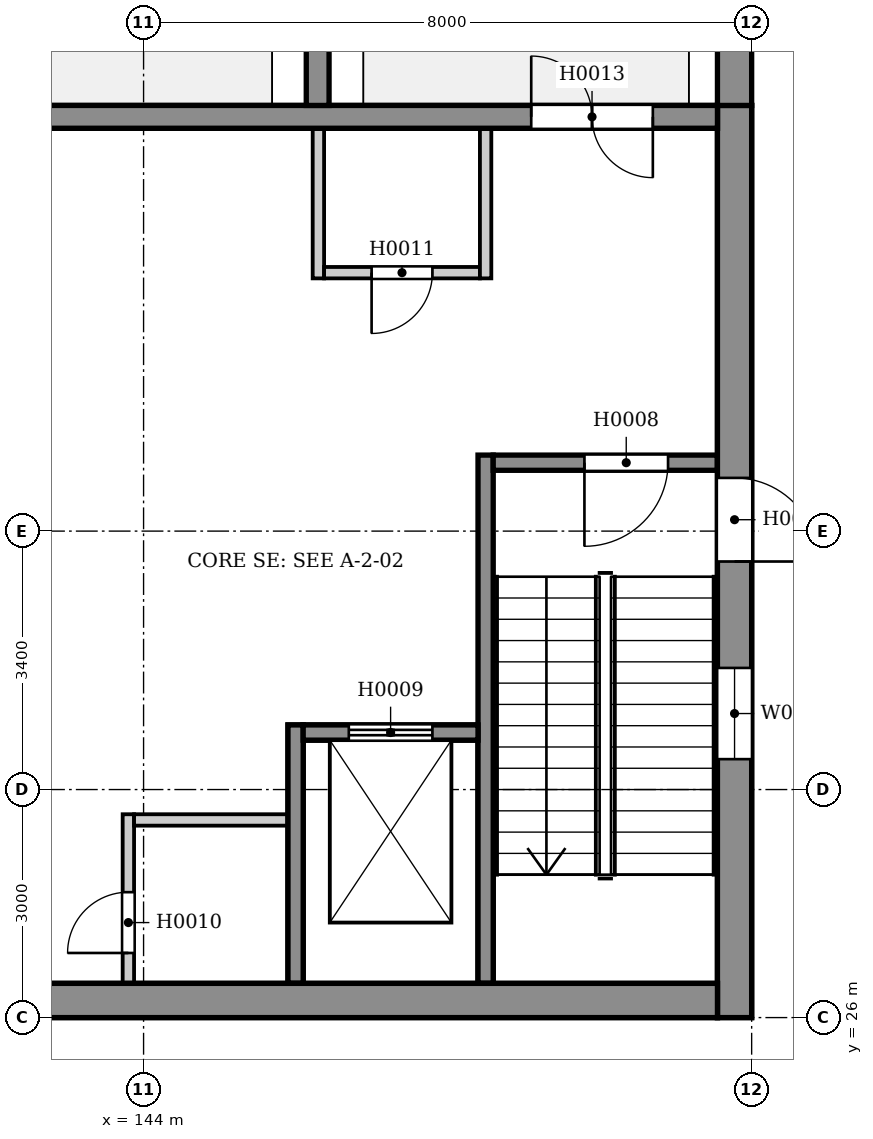
"""IFC4 building model, lengths in metres.
Left out: names, types, materials, properties, quantities, classifications, styles, units other than length and angle.
Written with IfcOpenShell. Run it as: python <this file> out.ifc"""

import sys

from ifc_helpers import new_model, si_unit, direction, frame, frame_2d, origin, place, context, subcontext, project, spatial, rectangle, extrude, element, fill, save


model = new_model("IFC4")
c1 = context("Model", 3, precision=1e-05, world=origin(), true_north=direction((0.0, 1.0)))
c2 = subcontext(c1, "Body", "Model", "MODEL_VIEW")
j1 = project(units=[si_unit("LENGTHUNIT", "METRE"), si_unit("PLANEANGLEUNIT", "RADIAN")], contexts=[c1])
p1 = place(None, origin())
s1 = spatial("IfcSite", under=j1, at=p1, CompositionType="ELEMENT")
p2 = place(p1, origin())
s2 = spatial("IfcBuilding", under=s1, at=p2, CompositionType="ELEMENT")
p3 = place(p2, origin())
s3 = spatial("IfcBuildingStorey", under=s2, at=p3, CompositionType="ELEMENT", Elevation=0.0)
p4 = place(p3, frame((151.775, 38.0, 0.0), z_axis=(0.0, 0.0, 1.0), x_axis=(0.0, 1.0, 0.0)))
e1 = element("IfcWall", 1, at=p4, inside=s3, PredefinedType="ELEMENTEDWALL", context=c2, shape_type="SweptSolid", body=[
    extrude(rectangle(XDim=46.0, YDim=0.45, at=frame_2d((23.0, 0.0))), origin(), (0.0, 0.0, 1.0), 5.0),
])
p5 = place(p4, frame((10.9, 0.0, 0.0), z_axis=(0.0, 0.0, 1.0), x_axis=(-1.0, 0.0, 0.0)))
e2 = element("IfcOpeningElement", 2, at=p5, cuts=e1, PredefinedType="OPENING", context=c2, shape_type="SweptSolid", body=[
    extrude(rectangle(XDim=1.8, YDim=2.4, at=frame_2d((0.9, 1.2))), frame((0.0, 0.235, 0.0), z_axis=(0.0, -1.0, 0.0), x_axis=(1.0, 0.0, 0.0)), (0.0, 0.0, 1.0), 0.47),
])
p6 = place(p4, frame((36.9, 0.0, 0.0), z_axis=(0.0, 0.0, 1.0), x_axis=(-1.0, 0.0, 0.0)))
e3 = element("IfcOpeningElement", 3, at=p6, cuts=e1, PredefinedType="OPENING", context=c2, shape_type="SweptSolid", body=[
    extrude(rectangle(XDim=1.8, YDim=2.4, at=frame_2d((0.9, 1.2))), frame((0.0, 0.235, 0.0), z_axis=(0.0, -1.0, 0.0), x_axis=(1.0, 0.0, 0.0)), (0.0, 0.0, 1.0), 0.47),
])
p7 = place(p4, frame((31.1, 0.0, 0.0)))
e4 = element("IfcOpeningElement", 4, at=p7, cuts=e1, PredefinedType="OPENING", context=c2, shape_type="SweptSolid", body=[
    extrude(rectangle(XDim=1.8, YDim=2.4, at=frame_2d((0.9, 1.2))), frame((0.0, 0.235, 0.0), z_axis=(0.0, -1.0, 0.0), x_axis=(1.0, 0.0, 0.0)), (0.0, 0.0, 1.0), 0.47),
])
p8 = place(p3, frame((146.29, 38.0, 0.0), z_axis=(0.0, 0.0, 1.0), x_axis=(0.0, 1.0, 0.0)))
e5 = element("IfcWall", 5, at=p8, inside=s3, PredefinedType="SOLIDWALL", context=c2, shape_type="SweptSolid", body=[
    extrude(rectangle(XDim=46.0, YDim=0.3, at=frame_2d((23.0, 0.0))), origin(), (0.0, 0.0, 1.0), 5.0),
])
p9 = place(p8, frame((1.975, 0.0, 0.0)))
e6 = element("IfcOpeningElement", 6, at=p9, cuts=e5, PredefinedType="OPENING", context=c2, shape_type="SweptSolid", body=[
    extrude(rectangle(XDim=1.8, YDim=2.1, at=frame_2d((0.9, 1.05))), frame((0.0, 0.16, 0.0), z_axis=(0.0, -1.0, 0.0), x_axis=(1.0, 0.0, 0.0)), (0.0, 0.0, 1.0), 0.32),
])
p10 = place(p8, frame((7.725, 0.0, 0.0)))
e7 = element("IfcOpeningElement", 7, at=p10, cuts=e5, PredefinedType="OPENING", context=c2, shape_type="SweptSolid", body=[
    extrude(rectangle(XDim=1.8, YDim=2.1, at=frame_2d((0.9, 1.05))), frame((0.0, 0.16, 0.0), z_axis=(0.0, -1.0, 0.0), x_axis=(1.0, 0.0, 0.0)), (0.0, 0.0, 1.0), 0.32),
])
p11 = place(p8, frame((13.475, 0.0, 0.0)))
e8 = element("IfcOpeningElement", 8, at=p11, cuts=e5, PredefinedType="OPENING", context=c2, shape_type="SweptSolid", body=[
    extrude(rectangle(XDim=1.8, YDim=2.1, at=frame_2d((0.9, 1.05))), frame((0.0, 0.16, 0.0), z_axis=(0.0, -1.0, 0.0), x_axis=(1.0, 0.0, 0.0)), (0.0, 0.0, 1.0), 0.32),
])
p12 = place(p8, frame((19.225, 0.0, 0.0)))
e9 = element("IfcOpeningElement", 9, at=p12, cuts=e5, PredefinedType="OPENING", context=c2, shape_type="SweptSolid", body=[
    extrude(rectangle(XDim=1.8, YDim=2.1, at=frame_2d((0.9, 1.05))), frame((0.0, 0.16, 0.0), z_axis=(0.0, -1.0, 0.0), x_axis=(1.0, 0.0, 0.0)), (0.0, 0.0, 1.0), 0.32),
])
p13 = place(p8, frame((24.975, 0.0, 0.0)))
e10 = element("IfcOpeningElement", 10, at=p13, cuts=e5, PredefinedType="OPENING", context=c2, shape_type="SweptSolid", body=[
    extrude(rectangle(XDim=1.8, YDim=2.1, at=frame_2d((0.9, 1.05))), frame((0.0, 0.16, 0.0), z_axis=(0.0, -1.0, 0.0), x_axis=(1.0, 0.0, 0.0)), (0.0, 0.0, 1.0), 0.32),
])
p14 = place(p8, frame((30.725, 0.0, 0.0)))
e11 = element("IfcOpeningElement", 11, at=p14, cuts=e5, PredefinedType="OPENING", context=c2, shape_type="SweptSolid", body=[
    extrude(rectangle(XDim=1.8, YDim=2.1, at=frame_2d((0.9, 1.05))), frame((0.0, 0.16, 0.0), z_axis=(0.0, -1.0, 0.0), x_axis=(1.0, 0.0, 0.0)), (0.0, 0.0, 1.0), 0.32),
])
p15 = place(p8, frame((36.475, 0.0, 0.0)))
e12 = element("IfcOpeningElement", 12, at=p15, cuts=e5, PredefinedType="OPENING", context=c2, shape_type="SweptSolid", body=[
    extrude(rectangle(XDim=1.8, YDim=2.1, at=frame_2d((0.9, 1.05))), frame((0.0, 0.16, 0.0), z_axis=(0.0, -1.0, 0.0), x_axis=(1.0, 0.0, 0.0)), (0.0, 0.0, 1.0), 0.32),
])
p16 = place(p8, frame((42.225, 0.0, 0.0)))
e13 = element("IfcOpeningElement", 13, at=p16, cuts=e5, PredefinedType="OPENING", context=c2, shape_type="SweptSolid", body=[
    extrude(rectangle(XDim=1.8, YDim=2.1, at=frame_2d((0.9, 1.05))), frame((0.0, 0.16, 0.0), z_axis=(0.0, -1.0, 0.0), x_axis=(1.0, 0.0, 0.0)), (0.0, 0.0, 1.0), 0.32),
])
p17 = place(p3, frame((151.775, 26.0, -1.6), z_axis=(0.0, 0.0, 1.0), x_axis=(0.0, 1.0, 0.0)))
e14 = element("IfcWall", 14, at=p17, inside=s3, PredefinedType="ELEMENTEDWALL", context=c2, shape_type="SweptSolid", body=[
    extrude(rectangle(XDim=12.0, YDim=0.45, at=frame_2d((6.0, 0.0))), origin(), (0.0, 0.0, 1.0), 1.35),
])
p18 = place(p3, frame((151.775, 26.0, 0.0), z_axis=(0.0, 0.0, 1.0), x_axis=(0.0, 1.0, 0.0)))
e15 = element("IfcWall", 15, at=p18, inside=s3, PredefinedType="ELEMENTEDWALL", context=c2, shape_type="SweptSolid", body=[
    extrude(rectangle(XDim=12.0, YDim=0.45, at=frame_2d((6.0, 0.0))), origin(), (0.0, 0.0, 1.0), 5.0),
])
p19 = place(p18, frame((7.1, 0.0, 0.0), z_axis=(0.0, 0.0, 1.0), x_axis=(-1.0, 0.0, 0.0)))
e16 = element("IfcOpeningElement", 16, at=p19, cuts=e15, PredefinedType="OPENING", context=c2, shape_type="SweptSolid", body=[
    extrude(rectangle(XDim=1.1, YDim=2.1, at=frame_2d((0.55, 1.05))), frame((0.0, 0.235, 0.0), z_axis=(0.0, -1.0, 0.0), x_axis=(1.0, 0.0, 0.0)), (0.0, 0.0, 1.0), 0.47),
])
p20 = place(p18, frame((3.4, 0.0, 0.6)))
e17 = element("IfcOpeningElement", 17, at=p20, cuts=e15, PredefinedType="OPENING", context=c2, shape_type="SweptSolid", body=[
    extrude(rectangle(XDim=1.2, YDim=3.0, at=frame_2d((0.6, 1.5))), frame((0.0, 0.235, 0.0), z_axis=(0.0, -1.0, 0.0), x_axis=(1.0, 0.0, 0.0)), (0.0, 0.0, 1.0), 0.47),
])
p21 = place(p3, frame((151.55, 26.225, -1.6), z_axis=(0.0, 0.0, 1.0), x_axis=(-1.0, 0.0, 0.0)))
e18 = element("IfcWall", 18, at=p21, inside=s3, PredefinedType="ELEMENTEDWALL", context=c2, shape_type="SweptSolid", body=[
    extrude(rectangle(XDim=11.55, YDim=0.45, at=frame_2d((5.775, 0.0))), origin(), (0.0, 0.0, 1.0), 1.35),
])
p22 = place(p3, frame((151.55, 26.225, 0.0), z_axis=(0.0, 0.0, 1.0), x_axis=(-1.0, 0.0, 0.0)))
e19 = element("IfcWall", 19, at=p22, inside=s3, PredefinedType="ELEMENTEDWALL", context=c2, shape_type="SweptSolid", body=[
    extrude(rectangle(XDim=11.55, YDim=0.45, at=frame_2d((5.775, 0.0))), origin(), (0.0, 0.0, 1.0), 5.0),
])
p23 = place(p3, frame((151.55, 37.85, -1.6), z_axis=(0.0, 0.0, 1.0), x_axis=(-1.0, 0.0, 0.0)))
e20 = element("IfcWall", 20, at=p23, inside=s3, PredefinedType="SOLIDWALL", context=c2, shape_type="SweptSolid", body=[
    extrude(rectangle(XDim=11.55, YDim=0.3, at=frame_2d((5.775, 0.0))), origin(), (0.0, 0.0, 1.0), 1.35),
])
p24 = place(p3, frame((151.55, 37.85, 0.0), z_axis=(0.0, 0.0, 1.0), x_axis=(-1.0, 0.0, 0.0)))
e21 = element("IfcWall", 21, at=p24, inside=s3, PredefinedType="SOLIDWALL", context=c2, shape_type="SweptSolid", body=[
    extrude(rectangle(XDim=11.55, YDim=0.3, at=frame_2d((5.775, 0.0))), origin(), (0.0, 0.0, 1.0), 5.0),
])
p25 = place(p24, frame((0.85, 0.0, 0.0)))
e22 = element("IfcOpeningElement", 22, at=p25, cuts=e21, PredefinedType="OPENING", context=c2, shape_type="SweptSolid", body=[
    extrude(rectangle(XDim=1.6, YDim=2.1, at=frame_2d((0.8, 1.05))), frame((0.0, 0.16, 0.0), z_axis=(0.0, -1.0, 0.0), x_axis=(1.0, 0.0, 0.0)), (0.0, 0.0, 1.0), 0.32),
])
p26 = place(p3, frame((148.5, 26.45, 0.0), z_axis=(0.0, 0.0, 1.0), x_axis=(0.0, 1.0, 0.0)))
e23 = element("IfcWall", 23, at=p26, inside=s3, PredefinedType="SOLIDWALL", context=c2, shape_type="SweptSolid", body=[
    extrude(rectangle(XDim=6.95, YDim=0.2, at=frame_2d((3.475, 0.0))), origin(), (0.0, 0.0, 1.0), 5.0),
])
p27 = place(p3, frame((151.55, 33.3, 0.0), z_axis=(0.0, 0.0, 1.0), x_axis=(-1.0, 0.0, 0.0)))
e24 = element("IfcWall", 24, at=p27, inside=s3, PredefinedType="SOLIDWALL", context=c2, shape_type="SweptSolid", body=[
    extrude(rectangle(XDim=2.95, YDim=0.2, at=frame_2d((1.475, 0.0))), origin(), (0.0, 0.0, 1.0), 5.0),
])
p28 = place(p27, frame((0.65, 0.0, 0.0)))
e25 = element("IfcOpeningElement", 25, at=p28, cuts=e24, PredefinedType="OPENING", context=c2, shape_type="SweptSolid", body=[
    extrude(rectangle(XDim=1.1, YDim=2.1, at=frame_2d((0.55, 1.05))), frame((0.0, 0.11, 0.0), z_axis=(0.0, -1.0, 0.0), x_axis=(1.0, 0.0, 0.0)), (0.0, 0.0, 1.0), 0.22),
])
p29 = place(p3, frame((146.0, 26.45, 0.0), z_axis=(0.0, 0.0, 1.0), x_axis=(0.0, 1.0, 0.0)))
e26 = element("IfcWall", 26, at=p29, inside=s3, PredefinedType="SOLIDWALL", context=c2, shape_type="SweptSolid", body=[
    extrude(rectangle(XDim=3.4, YDim=0.2, at=frame_2d((1.7, 0.0))), origin(), (0.0, 0.0, 1.0), 5.0),
])
p30 = place(p3, frame((148.4, 29.75, 0.0), z_axis=(0.0, 0.0, 1.0), x_axis=(-1.0, 0.0, 0.0)))
e27 = element("IfcWall", 27, at=p30, inside=s3, PredefinedType="SOLIDWALL", context=c2, shape_type="SweptSolid", body=[
    extrude(rectangle(XDim=2.3, YDim=0.2, at=frame_2d((1.15, 0.0))), origin(), (0.0, 0.0, 1.0), 5.0),
])
p31 = place(p30, frame((0.6, 0.0, 0.0)))
e28 = element("IfcOpeningElement", 28, at=p31, cuts=e27, PredefinedType="OPENING", context=c2, shape_type="SweptSolid", body=[
    extrude(rectangle(XDim=1.1, YDim=2.1, at=frame_2d((0.55, 1.05))), frame((0.0, 0.11, 0.0), z_axis=(0.0, -1.0, 0.0), x_axis=(1.0, 0.0, 0.0)), (0.0, 0.0, 1.0), 0.22),
])
p32 = place(p3, frame((145.9, 28.6, 0.0), z_axis=(0.0, 0.0, 1.0), x_axis=(-1.0, 0.0, 0.0)))
e29 = element("IfcWall", 29, at=p32, inside=s3, PredefinedType="PARTITIONING", context=c2, shape_type="SweptSolid", body=[
    extrude(rectangle(XDim=2.025, YDim=0.15, at=frame_2d((1.012, 0.0))), origin(), (0.0, 0.0, 1.0), 4.75),
])
p33 = place(p3, frame((143.8, 26.45, 0.0), z_axis=(0.0, 0.0, 1.0), x_axis=(0.0, 1.0, 0.0)))
e30 = element("IfcWall", 30, at=p33, inside=s3, PredefinedType="PARTITIONING", context=c2, shape_type="SweptSolid", body=[
    extrude(rectangle(XDim=2.225, YDim=0.15, at=frame_2d((1.113, 0.0))), origin(), (0.0, 0.0, 1.0), 4.75),
])
p34 = place(p33, frame((0.4, 0.0, 0.0)))
e31 = element("IfcOpeningElement", 31, at=p34, cuts=e30, PredefinedType="OPENING", context=c2, shape_type="SweptSolid", body=[
    extrude(rectangle(XDim=0.8, YDim=2.1, at=frame_2d((0.4, 1.05))), frame((0.0, 0.085, 0.0), z_axis=(0.0, -1.0, 0.0), x_axis=(1.0, 0.0, 0.0)), (0.0, 0.0, 1.0), 0.17),
])
p35 = place(p3, frame((148.425, 35.8, 0.0), z_axis=(0.0, 0.0, 1.0), x_axis=(-1.0, 0.0, 0.0)))
e32 = element("IfcWall", 32, at=p35, inside=s3, PredefinedType="PARTITIONING", context=c2, shape_type="SweptSolid", body=[
    extrude(rectangle(XDim=2.05, YDim=0.15, at=frame_2d((1.025, 0.0))), origin(), (0.0, 0.0, 1.0), 4.75),
])
p36 = place(p35, frame((0.625, 0.0, 0.0)))
e33 = element("IfcOpeningElement", 33, at=p36, cuts=e32, PredefinedType="OPENING", context=c2, shape_type="SweptSolid", body=[
    extrude(rectangle(XDim=0.8, YDim=2.1, at=frame_2d((0.4, 1.05))), frame((0.0, 0.085, 0.0), z_axis=(0.0, -1.0, 0.0), x_axis=(1.0, 0.0, 0.0)), (0.0, 0.0, 1.0), 0.17),
])
for number, where, z_axis, x_axis in (
    (34, (148.5, 35.725, 0.0), (0.0, 0.0, 1.0), (0.0, 1.0, 0.0)),
    (35, (146.3, 35.725, 0.0), (0.0, 0.0, 1.0), (0.0, 1.0, 0.0)),
):
    element("IfcWall", number, at=place(p3, frame(where, z_axis=z_axis, x_axis=x_axis)), inside=s3, PredefinedType="PARTITIONING", context=c2, shape_type="SweptSolid", body=[
        extrude(rectangle(XDim=1.975, YDim=0.15, at=frame_2d((0.987, 0.0))), origin(), (0.0, 0.0, 1.0), 4.75),
    ])
for number, where, z_axis, x_axis in (
    (36, (148.5, 26.45, -1.3), (0.0, 0.0, 1.0), (0.0, 1.0, 0.0)),
    (37, (146.0, 26.45, -1.3), (0.0, 0.0, 1.0), (0.0, 1.0, 0.0)),
):
    element("IfcWall", number, at=place(p3, frame(where, z_axis=z_axis, x_axis=x_axis)), inside=s3, PredefinedType="SOLIDWALL", context=c2, shape_type="SweptSolid", body=[
        extrude(rectangle(XDim=3.4, YDim=0.2, at=frame_2d((1.7, 0.0))), origin(), (0.0, 0.0, 1.0), 1.05),
    ])
p37 = place(p3, frame((148.4, 29.75, -1.3), z_axis=(0.0, 0.0, 1.0), x_axis=(-1.0, 0.0, 0.0)))
e38 = element("IfcWall", 38, at=p37, inside=s3, PredefinedType="SOLIDWALL", context=c2, shape_type="SweptSolid", body=[
    extrude(rectangle(XDim=2.3, YDim=0.2, at=frame_2d((1.15, 0.0))), origin(), (0.0, 0.0, 1.0), 1.05),
])
p38 = place(p28, origin())
e39 = element("IfcDoor", 39, at=p38, inside=s3, OperationType="SINGLE_SWING_RIGHT", PredefinedType="DOOR", context=c2, shape_type="SweptSolid", body=[
    extrude(rectangle(XDim=1.1, YDim=2.1, at=frame_2d((0.55, 1.05))), frame((0.0, 0.025, 0.0), z_axis=(0.0, -1.0, 0.0), x_axis=(1.0, 0.0, 0.0)), (0.0, 0.0, 1.0), 0.05),
])
fill(e25, e39)
p39 = place(p31, origin())
e40 = element("IfcDoor", 40, at=p39, inside=s3, OperationType="DOUBLE_DOOR_SLIDING", PredefinedType="DOOR", context=c2, shape_type="SweptSolid", body=[
    extrude(rectangle(XDim=1.1, YDim=2.1, at=frame_2d((0.55, 1.05))), frame((0.0, 0.025, 0.0), z_axis=(0.0, -1.0, 0.0), x_axis=(1.0, 0.0, 0.0)), (0.0, 0.0, 1.0), 0.05),
])
fill(e28, e40)
p40 = place(p34, origin())
e41 = element("IfcDoor", 41, at=p40, inside=s3, OperationType="SINGLE_SWING_LEFT", PredefinedType="DOOR", context=c2, shape_type="SweptSolid", body=[
    extrude(rectangle(XDim=0.8, YDim=2.1, at=frame_2d((0.4, 1.05))), frame((0.0, 0.025, 0.0), z_axis=(0.0, -1.0, 0.0), x_axis=(1.0, 0.0, 0.0)), (0.0, 0.0, 1.0), 0.05),
])
fill(e31, e41)
p41 = place(p36, origin())
e42 = element("IfcDoor", 42, at=p41, inside=s3, OperationType="SINGLE_SWING_RIGHT", PredefinedType="DOOR", context=c2, shape_type="SweptSolid", body=[
    extrude(rectangle(XDim=0.8, YDim=2.1, at=frame_2d((0.4, 1.05))), frame((0.0, 0.025, 0.0), z_axis=(0.0, -1.0, 0.0), x_axis=(1.0, 0.0, 0.0)), (0.0, 0.0, 1.0), 0.05),
])
fill(e33, e42)
p42 = place(p25, origin())
e43 = element("IfcDoor", 43, at=p42, inside=s3, OperationType="DOUBLE_DOOR_SINGLE_SWING", PredefinedType="DOOR", context=c2, shape_type="SweptSolid", body=[
    extrude(rectangle(XDim=1.6, YDim=2.1, at=frame_2d((0.8, 1.05))), frame((0.0, 0.025, 0.0), z_axis=(0.0, -1.0, 0.0), x_axis=(1.0, 0.0, 0.0)), (0.0, 0.0, 1.0), 0.05),
])
fill(e22, e43)
p43 = place(p19, origin())
e44 = element("IfcDoor", 44, at=p43, inside=s3, OperationType="SINGLE_SWING_LEFT", PredefinedType="DOOR", context=c2, shape_type="SweptSolid", body=[
    extrude(rectangle(XDim=1.1, YDim=2.1, at=frame_2d((0.55, 1.05))), frame((0.0, 0.025, 0.0), z_axis=(0.0, -1.0, 0.0), x_axis=(1.0, 0.0, 0.0)), (0.0, 0.0, 1.0), 0.05),
])
fill(e16, e44)
p44 = place(p20, origin())
e45 = element("IfcWindow", 45, at=p44, inside=s3, PartitioningType="SINGLE_PANEL", PredefinedType="WINDOW", context=c2, shape_type="SweptSolid", body=[
    extrude(rectangle(XDim=1.2, YDim=3.0, at=frame_2d((0.6, 1.5))), frame((0.0, 0.03, 0.0), z_axis=(0.0, -1.0, 0.0), x_axis=(1.0, 0.0, 0.0)), (0.0, 0.0, 1.0), 0.06),
])
fill(e17, e45)
save(model, sys.argv[1])
